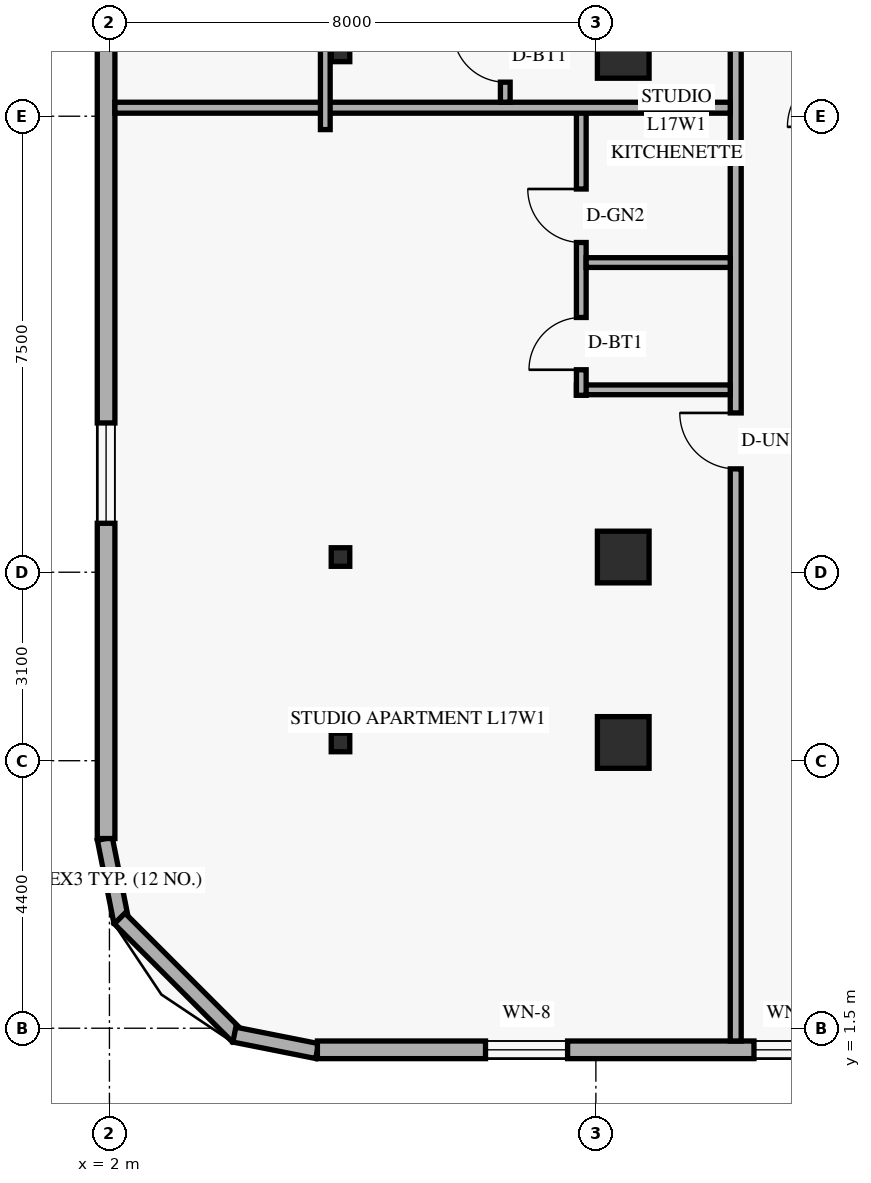
"""IFC4 building model, lengths in metres.
Left out: names, types, materials, properties, quantities, classifications, styles, units other than length and angle.
Written with IfcOpenShell. Run it as: python <this file> out.ifc"""

import sys

from ifc_helpers import new_model, si_unit, direction, frame, frame_2d, origin, origin_2d, place, context, subcontext, project, spatial, rectangle, hollow_rectangle, extrude, element, fill, save


model = new_model("IFC4")
c1 = context("Model", 3, precision=1e-05, world=origin(), true_north=direction((0.0, 1.0)))
c2 = subcontext(c1, "Body", "Model", "MODEL_VIEW")
j1 = project(units=[si_unit("LENGTHUNIT", "METRE"), si_unit("PLANEANGLEUNIT", "RADIAN")], contexts=[c1])
p1 = place(None, origin())
s1 = spatial("IfcSite", under=j1, at=p1, CompositionType="ELEMENT")
p2 = place(p1, origin())
s2 = spatial("IfcBuilding", under=s1, at=p2, CompositionType="ELEMENT")
p3 = place(p2, frame((0.0, 0.0, 67.8)))
s3 = spatial("IfcBuildingStorey", under=s2, at=p3, CompositionType="ELEMENT", Elevation=67.8)
for number, where, z_axis, x_axis in (
    (1, (5.8, 6.2, 0.0), (0.0, 0.0, 1.0), (1.0, 0.0, 0.0)),
    (2, (5.8, 9.25, 0.0), (0.0, 0.0, 1.0), (1.0, 0.0, 0.0)),
    (3, (5.8, 17.55, 0.0), (0.0, 0.0, 1.0), (1.0, 0.0, 0.0)),
):
    element("IfcColumn", number, at=place(p3, frame(where, z_axis=z_axis, x_axis=x_axis)), inside=s3, PredefinedType="COLUMN", context=c2, shape_type="SweptSolid", body=[
        extrude(hollow_rectangle(XDim=0.305, YDim=0.305, WallThickness=0.013, at=origin_2d()), origin(), (0.0, 0.0, 1.0), 3.6),
    ])
for number, where, z_axis, x_axis in (
    (4, (10.45, 6.2, 0.0), (0.0, 0.0, 1.0), (1.0, 0.0, 0.0)),
    (5, (10.45, 9.25, 0.0), (0.0, 0.0, 1.0), (1.0, 0.0, 0.0)),
    (6, (10.45, 17.55, 0.0), (0.0, 0.0, 1.0), (1.0, 0.0, 0.0)),
):
    element("IfcColumn", number, at=place(p3, frame(where, z_axis=z_axis, x_axis=x_axis)), inside=s3, PredefinedType="COLUMN", context=c2, shape_type="SweptSolid", body=[
        extrude(rectangle(XDim=0.85, YDim=0.85, at=origin_2d()), origin(), (0.0, 0.0, 1.0), 3.6),
    ])
p4 = place(p3, frame((1.924, 4.616, 0.0), z_axis=(0.0, 0.0, 1.0), x_axis=(0.19496651342, -0.980809899341, 0.0)))
e7 = element("IfcWall", 7, at=p4, inside=s3, PredefinedType="SOLIDWALL", context=c2, shape_type="SweptSolid", body=[
    extrude(rectangle(XDim=1.389, YDim=0.25, at=frame_2d((0.694, 0.0))), origin(), (0.0, 0.0, 1.0), 3.3),
])
p5 = place(p3, frame((2.168, 3.305, 0.0), z_axis=(0.0, 0.0, 1.0), x_axis=(0.707106781187, -0.707106781187, 0.0)))
e8 = element("IfcWall", 8, at=p5, inside=s3, PredefinedType="SOLIDWALL", context=c2, shape_type="SweptSolid", body=[
    extrude(rectangle(XDim=2.739, YDim=0.25, at=frame_2d((1.37, 0.0))), origin(), (0.0, 0.0, 1.0), 3.3),
])
p6 = place(p3, frame((4.054, 1.395, 0.0), z_axis=(0.0, 0.0, 1.0), x_axis=(0.980809899341, -0.19496651342, 0.0)))
e9 = element("IfcWall", 9, at=p6, inside=s3, PredefinedType="SOLIDWALL", context=c2, shape_type="SweptSolid", body=[
    extrude(rectangle(XDim=1.389, YDim=0.25, at=frame_2d((0.694, 0.0))), origin(), (0.0, 0.0, 1.0), 3.3),
])
p7 = place(p3, frame((5.42, 1.145, 0.0), z_axis=(0.0, 0.0, 1.0), x_axis=(1.0, 0.0, 0.0)))
e10 = element("IfcWall", 10, at=p7, inside=s3, PredefinedType="SOLIDWALL", context=c2, shape_type="SweptSolid", body=[
    extrude(rectangle(XDim=39.56, YDim=0.29, at=frame_2d((19.78, 0.0))), origin(), (0.0, 0.0, 1.0), 3.3),
])
p8 = place(p7, frame((2.765, 0.0, 0.85)))
e11 = element("IfcOpeningElement", 11, at=p8, cuts=e10, PredefinedType="OPENING", context=c2, shape_type="SweptSolid", body=[
    extrude(rectangle(XDim=1.35, YDim=1.55, at=frame_2d((0.675, 0.775))), frame((0.0, 0.155, 0.0), z_axis=(0.0, -1.0, 0.0), x_axis=(1.0, 0.0, 0.0)), (0.0, 0.0, 1.0), 0.31),
])
p9 = place(p7, frame((7.18, 0.0, 0.85)))
e12 = element("IfcOpeningElement", 12, at=p9, cuts=e10, PredefinedType="OPENING", context=c2, shape_type="SweptSolid", body=[
    extrude(rectangle(XDim=1.2, YDim=1.5, at=frame_2d((0.6, 0.75))), frame((0.0, 0.155, 0.0), z_axis=(0.0, -1.0, 0.0), x_axis=(1.0, 0.0, 0.0)), (0.0, 0.0, 1.0), 0.31),
])
p10 = place(p7, frame((12.056, 0.0, 0.85)))
e13 = element("IfcOpeningElement", 13, at=p10, cuts=e10, PredefinedType="OPENING", context=c2, shape_type="SweptSolid", body=[
    extrude(rectangle(XDim=1.35, YDim=1.55, at=frame_2d((0.675, 0.775))), frame((0.0, 0.155, 0.0), z_axis=(0.0, -1.0, 0.0), x_axis=(1.0, 0.0, 0.0)), (0.0, 0.0, 1.0), 0.31),
])
p11 = place(p7, frame((18.665, 0.0, 0.85)))
e14 = element("IfcOpeningElement", 14, at=p11, cuts=e10, PredefinedType="OPENING", context=c2, shape_type="SweptSolid", body=[
    extrude(rectangle(XDim=1.35, YDim=1.55, at=frame_2d((0.675, 0.775))), frame((0.0, 0.155, 0.0), z_axis=(0.0, -1.0, 0.0), x_axis=(1.0, 0.0, 0.0)), (0.0, 0.0, 1.0), 0.31),
])
p12 = place(p7, frame((25.274, 0.0, 0.85)))
e15 = element("IfcOpeningElement", 15, at=p12, cuts=e10, PredefinedType="OPENING", context=c2, shape_type="SweptSolid", body=[
    extrude(rectangle(XDim=1.35, YDim=1.55, at=frame_2d((0.675, 0.775))), frame((0.0, 0.155, 0.0), z_axis=(0.0, -1.0, 0.0), x_axis=(1.0, 0.0, 0.0)), (0.0, 0.0, 1.0), 0.31),
])
p13 = place(p7, frame((30.39, 0.0, 0.85)))
e16 = element("IfcOpeningElement", 16, at=p13, cuts=e10, PredefinedType="OPENING", context=c2, shape_type="SweptSolid", body=[
    extrude(rectangle(XDim=1.35, YDim=1.55, at=frame_2d((0.675, 0.775))), frame((0.0, 0.155, 0.0), z_axis=(0.0, -1.0, 0.0), x_axis=(1.0, 0.0, 0.0)), (0.0, 0.0, 1.0), 0.31),
])
p14 = place(p7, frame((35.17, 0.0, 0.85)))
e17 = element("IfcOpeningElement", 17, at=p14, cuts=e10, PredefinedType="OPENING", context=c2, shape_type="SweptSolid", body=[
    extrude(rectangle(XDim=1.35, YDim=1.55, at=frame_2d((0.675, 0.775))), frame((0.0, 0.155, 0.0), z_axis=(0.0, -1.0, 0.0), x_axis=(1.0, 0.0, 0.0)), (0.0, 0.0, 1.0), 0.31),
])
p15 = place(p3, frame((1.945, 43.38, 0.0), z_axis=(0.0, 0.0, 1.0), x_axis=(0.0, -1.0, 0.0)))
e18 = element("IfcWall", 18, at=p15, inside=s3, PredefinedType="SOLIDWALL", context=c2, shape_type="SweptSolid", body=[
    extrude(rectangle(XDim=38.76, YDim=0.29, at=frame_2d((19.38, 0.0))), origin(), (0.0, 0.0, 1.0), 3.3),
])
p16 = place(p15, frame((31.925, 0.0, 0.85)))
e19 = element("IfcOpeningElement", 19, at=p16, cuts=e18, PredefinedType="OPENING", context=c2, shape_type="SweptSolid", body=[
    extrude(rectangle(XDim=1.65, YDim=1.6, at=frame_2d((0.825, 0.8))), frame((0.0, 0.155, 0.0), z_axis=(0.0, -1.0, 0.0), x_axis=(1.0, 0.0, 0.0)), (0.0, 0.0, 1.0), 0.31),
])
p17 = place(p15, frame((22.97, 0.0, 0.85)))
e20 = element("IfcOpeningElement", 20, at=p17, cuts=e18, PredefinedType="OPENING", context=c2, shape_type="SweptSolid", body=[
    extrude(rectangle(XDim=1.65, YDim=1.6, at=frame_2d((0.825, 0.8))), frame((0.0, 0.155, 0.0), z_axis=(0.0, -1.0, 0.0), x_axis=(1.0, 0.0, 0.0)), (0.0, 0.0, 1.0), 0.31),
])
p18 = place(p15, frame((15.15, 0.0, 0.85)))
e21 = element("IfcOpeningElement", 21, at=p18, cuts=e18, PredefinedType="OPENING", context=c2, shape_type="SweptSolid", body=[
    extrude(rectangle(XDim=1.65, YDim=1.6, at=frame_2d((0.825, 0.8))), frame((0.0, 0.155, 0.0), z_axis=(0.0, -1.0, 0.0), x_axis=(1.0, 0.0, 0.0)), (0.0, 0.0, 1.0), 0.31),
])
p19 = place(p15, frame((7.33, 0.0, 0.85)))
e22 = element("IfcOpeningElement", 22, at=p19, cuts=e18, PredefinedType="OPENING", context=c2, shape_type="SweptSolid", body=[
    extrude(rectangle(XDim=1.65, YDim=1.6, at=frame_2d((0.825, 0.8))), frame((0.0, 0.155, 0.0), z_axis=(0.0, -1.0, 0.0), x_axis=(1.0, 0.0, 0.0)), (0.0, 0.0, 1.0), 0.31),
])
p20 = place(p15, frame((1.78, 0.0, 0.85)))
e23 = element("IfcOpeningElement", 23, at=p20, cuts=e18, PredefinedType="OPENING", context=c2, shape_type="SweptSolid", body=[
    extrude(rectangle(XDim=1.65, YDim=1.6, at=frame_2d((0.825, 0.8))), frame((0.0, 0.155, 0.0), z_axis=(0.0, -1.0, 0.0), x_axis=(1.0, 0.0, 0.0)), (0.0, 0.0, 1.0), 0.31),
])
p21 = place(p3, frame((12.3, 1.29, 0.0), z_axis=(0.0, 0.0, 1.0), x_axis=(0.0, 1.0, 0.0)))
e24 = element("IfcWall", 24, at=p21, inside=s3, PredefinedType="STANDARD", context=c2, shape_type="SweptSolid", body=[
    extrude(rectangle(XDim=45.42, YDim=0.18, at=frame_2d((22.71, 0.0))), origin(), (0.0, 0.0, 1.0), 2.589),
])
p22 = place(p21, frame((9.41, 0.0, 0.0)))
e25 = element("IfcOpeningElement", 25, at=p22, cuts=e24, PredefinedType="OPENING", context=c2, shape_type="SweptSolid", body=[
    extrude(rectangle(XDim=0.92, YDim=2.15, at=frame_2d((0.46, 1.075))), frame((0.0, 0.1, 0.0), z_axis=(0.0, -1.0, 0.0), x_axis=(1.0, 0.0, 0.0)), (0.0, 0.0, 1.0), 0.2),
])
p23 = place(p21, frame((20.35, 0.0, 0.0)))
e26 = element("IfcOpeningElement", 26, at=p23, cuts=e24, PredefinedType="OPENING", context=c2, shape_type="SweptSolid", body=[
    extrude(rectangle(XDim=0.92, YDim=2.15, at=frame_2d((0.46, 1.075))), frame((0.0, 0.1, 0.0), z_axis=(0.0, -1.0, 0.0), x_axis=(1.0, 0.0, 0.0)), (0.0, 0.0, 1.0), 0.2),
])
p24 = place(p21, frame((35.99, 0.0, 0.0)))
e27 = element("IfcOpeningElement", 27, at=p24, cuts=e24, PredefinedType="OPENING", context=c2, shape_type="SweptSolid", body=[
    extrude(rectangle(XDim=0.92, YDim=2.15, at=frame_2d((0.46, 1.075))), frame((0.0, 0.1, 0.0), z_axis=(0.0, -1.0, 0.0), x_axis=(1.0, 0.0, 0.0)), (0.0, 0.0, 1.0), 0.2),
])
p25 = place(p3, frame((9.68, 12.0, 0.0), z_axis=(0.0, 0.0, 1.0), x_axis=(1.0, 0.0, 0.0)))
e28 = element("IfcWall", 28, at=p25, inside=s3, PredefinedType="PLUMBINGWALL", context=c2, shape_type="SweptSolid", body=[
    extrude(rectangle(XDim=2.53, YDim=0.16, at=frame_2d((1.265, 0.0))), origin(), (0.0, 0.0, 1.0), 2.589),
])
p26 = place(p3, frame((9.76, 11.91, 0.0), z_axis=(0.0, 0.0, 1.0), x_axis=(0.0, 1.0, 0.0)))
e29 = element("IfcWall", 29, at=p26, inside=s3, PredefinedType="PLUMBINGWALL", context=c2, shape_type="SweptSolid", body=[
    extrude(rectangle(XDim=4.73, YDim=0.16, at=frame_2d((2.365, 0.0))), origin(), (0.0, 0.0, 1.0), 2.872),
])
p27 = place(p26, frame((0.42, 0.0, 0.0)))
e30 = element("IfcOpeningElement", 30, at=p27, cuts=e29, PredefinedType="OPENING", context=c2, shape_type="SweptSolid", body=[
    extrude(rectangle(XDim=0.86, YDim=2.12, at=frame_2d((0.43, 1.06))), frame((0.0, 0.09, 0.0), z_axis=(0.0, -1.0, 0.0), x_axis=(1.0, 0.0, 0.0)), (0.0, 0.0, 1.0), 0.18),
])
p28 = place(p26, frame((2.513, 0.0, 0.0)))
e31 = element("IfcOpeningElement", 31, at=p28, cuts=e29, PredefinedType="OPENING", context=c2, shape_type="SweptSolid", body=[
    extrude(rectangle(XDim=0.88, YDim=2.12, at=frame_2d((0.44, 1.06))), frame((0.0, 0.09, 0.0), z_axis=(0.0, -1.0, 0.0), x_axis=(1.0, 0.0, 0.0)), (0.0, 0.0, 1.0), 0.18),
])
p29 = place(p3, frame((9.84, 14.093, 0.0), z_axis=(0.0, 0.0, 1.0), x_axis=(1.0, 0.0, 0.0)))
e32 = element("IfcWall", 32, at=p29, inside=s3, PredefinedType="PLUMBINGWALL", context=c2, shape_type="SweptSolid", body=[
    extrude(rectangle(XDim=2.37, YDim=0.16, at=frame_2d((1.185, 0.0))), origin(), (0.0, 0.0, 1.0), 2.589),
])
p30 = place(p3, frame((2.09, 16.64, 0.0), z_axis=(0.0, 0.0, 1.0), x_axis=(1.0, 0.0, 0.0)))
e33 = element("IfcWall", 33, at=p30, inside=s3, PredefinedType="PARTITIONING", context=c2, shape_type="SweptSolid", body=[
    extrude(rectangle(XDim=10.12, YDim=0.18, at=frame_2d((5.06, 0.0))), origin(), (0.0, 0.0, 1.0), 2.589),
])
p31 = place(p3, frame((8.51, 16.73, 0.0), z_axis=(0.0, 0.0, 1.0), x_axis=(0.0, 1.0, 0.0)))
e34 = element("IfcWall", 34, at=p31, inside=s3, PredefinedType="PLUMBINGWALL", context=c2, shape_type="SweptSolid", body=[
    extrude(rectangle(XDim=4.64, YDim=0.16, at=frame_2d((2.32, 0.0))), origin(), (0.0, 0.0, 1.0), 2.589),
])
p32 = place(p31, frame((0.33, 0.0, 0.0)))
e35 = element("IfcOpeningElement", 35, at=p32, cuts=e34, PredefinedType="OPENING", context=c2, shape_type="SweptSolid", body=[
    extrude(rectangle(XDim=0.86, YDim=2.12, at=frame_2d((0.43, 1.06))), frame((0.0, 0.09, 0.0), z_axis=(0.0, -1.0, 0.0), x_axis=(1.0, 0.0, 0.0)), (0.0, 0.0, 1.0), 0.18),
])
p33 = place(p31, frame((2.423, 0.0, 0.0)))
e36 = element("IfcOpeningElement", 36, at=p33, cuts=e34, PredefinedType="OPENING", context=c2, shape_type="SweptSolid", body=[
    extrude(rectangle(XDim=0.88, YDim=2.12, at=frame_2d((0.44, 1.06))), frame((0.0, 0.09, 0.0), z_axis=(0.0, -1.0, 0.0), x_axis=(1.0, 0.0, 0.0)), (0.0, 0.0, 1.0), 0.18),
])
p34 = place(p3, frame((5.55, 16.28, 0.0), z_axis=(0.0, 0.0, 1.0), x_axis=(0.0, 1.0, 0.0)))
e37 = element("IfcWall", 37, at=p34, inside=s3, PredefinedType="PARTITIONING", context=c2, shape_type="SweptSolid", body=[
    extrude(rectangle(XDim=6.25, YDim=0.16, at=frame_2d((3.125, 0.0))), origin(), (0.0, 0.0, 1.0), 3.3),
])
p35 = place(p8, origin())
e38 = element("IfcWindow", 38, at=p35, inside=s3, PartitioningType="SINGLE_PANEL", PredefinedType="WINDOW", context=c2, shape_type="SweptSolid", body=[
    extrude(rectangle(XDim=1.35, YDim=1.55, at=frame_2d((0.675, 0.775))), frame((0.0, 0.03, 0.0), z_axis=(0.0, -1.0, 0.0), x_axis=(1.0, 0.0, 0.0)), (0.0, 0.0, 1.0), 0.06),
])
fill(e11, e38)
p36 = place(p9, origin())
e39 = element("IfcWindow", 39, at=p36, inside=s3, PartitioningType="SINGLE_PANEL", PredefinedType="WINDOW", context=c2, shape_type="SweptSolid", body=[
    extrude(rectangle(XDim=1.2, YDim=1.5, at=frame_2d((0.6, 0.75))), frame((0.0, 0.03, 0.0), z_axis=(0.0, -1.0, 0.0), x_axis=(1.0, 0.0, 0.0)), (0.0, 0.0, 1.0), 0.06),
])
fill(e12, e39)
p37 = place(p16, origin())
e40 = element("IfcWindow", 40, at=p37, inside=s3, PartitioningType="SINGLE_PANEL", PredefinedType="WINDOW", context=c2, shape_type="SweptSolid", body=[
    extrude(rectangle(XDim=1.65, YDim=1.6, at=frame_2d((0.825, 0.8))), frame((0.0, 0.03, 0.0), z_axis=(0.0, -1.0, 0.0), x_axis=(1.0, 0.0, 0.0)), (0.0, 0.0, 1.0), 0.06),
])
fill(e19, e40)
p38 = place(p22, origin())
e41 = element("IfcDoor", 41, at=p38, inside=s3, OperationType="SINGLE_SWING_RIGHT", PredefinedType="DOOR", context=c2, shape_type="SweptSolid", body=[
    extrude(rectangle(XDim=0.92, YDim=2.15, at=frame_2d((0.46, 1.075))), frame((0.0, 0.025, 0.0), z_axis=(0.0, -1.0, 0.0), x_axis=(1.0, 0.0, 0.0)), (0.0, 0.0, 1.0), 0.05),
])
fill(e25, e41)
p39 = place(p27, origin())
e42 = element("IfcDoor", 42, at=p39, inside=s3, OperationType="SINGLE_SWING_LEFT", PredefinedType="DOOR", context=c2, shape_type="SweptSolid", body=[
    extrude(rectangle(XDim=0.86, YDim=2.12, at=frame_2d((0.43, 1.06))), frame((0.0, 0.025, 0.0), z_axis=(0.0, -1.0, 0.0), x_axis=(1.0, 0.0, 0.0)), (0.0, 0.0, 1.0), 0.05),
])
fill(e30, e42)
p40 = place(p28, origin())
e43 = element("IfcDoor", 43, at=p40, inside=s3, OperationType="SINGLE_SWING_RIGHT", PredefinedType="DOOR", context=c2, shape_type="SweptSolid", body=[
    extrude(rectangle(XDim=0.88, YDim=2.12, at=frame_2d((0.44, 1.06))), frame((0.0, 0.025, 0.0), z_axis=(0.0, -1.0, 0.0), x_axis=(1.0, 0.0, 0.0)), (0.0, 0.0, 1.0), 0.05),
])
fill(e31, e43)
p41 = place(p32, origin())
e44 = element("IfcDoor", 44, at=p41, inside=s3, OperationType="SINGLE_SWING_RIGHT", PredefinedType="DOOR", context=c2, shape_type="SweptSolid", body=[
    extrude(rectangle(XDim=0.86, YDim=2.12, at=frame_2d((0.43, 1.06))), frame((0.0, 0.025, 0.0), z_axis=(0.0, -1.0, 0.0), x_axis=(1.0, 0.0, 0.0)), (0.0, 0.0, 1.0), 0.05),
])
fill(e35, e44)
save(model, sys.argv[1])
